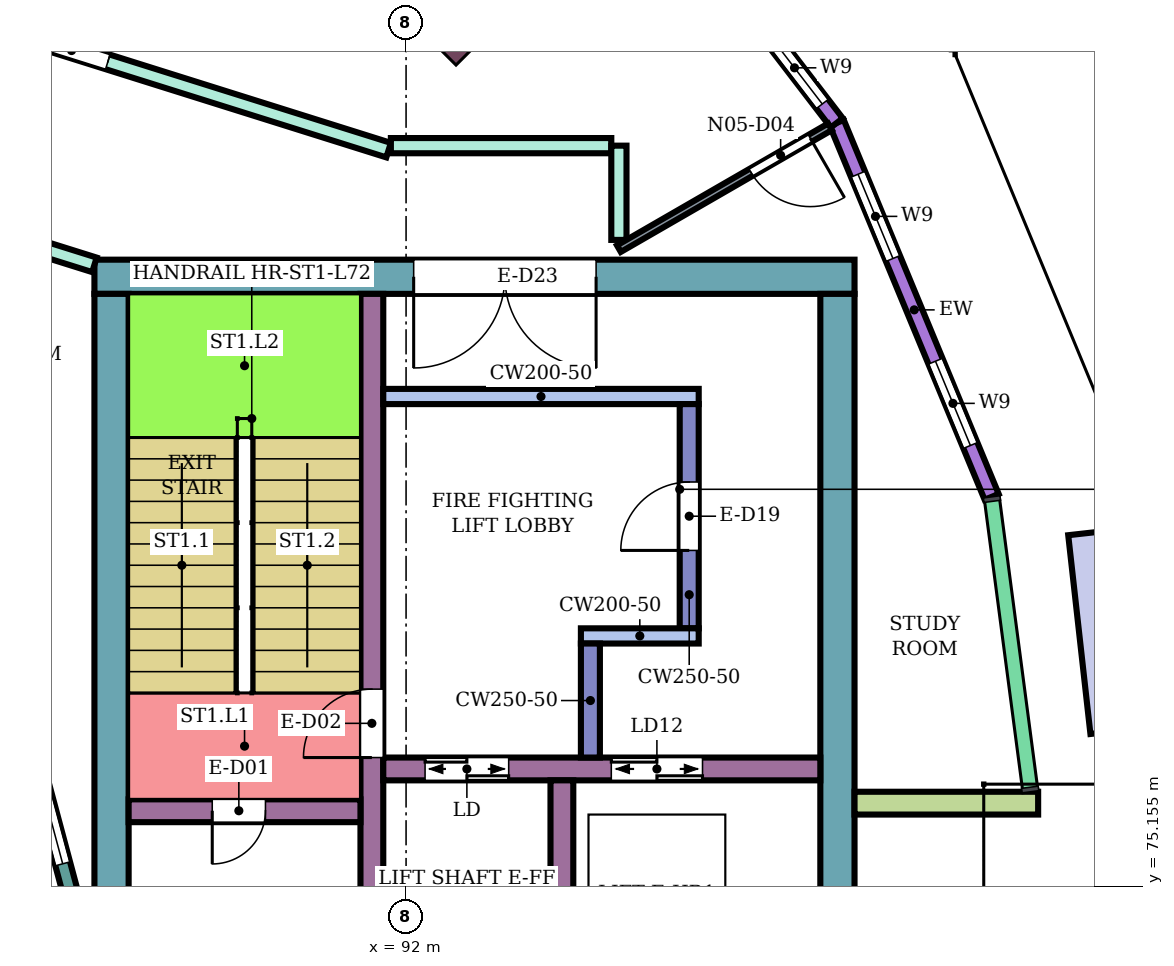
"""IFC4 building model, lengths in metres.
Left out: names, types, materials, properties, quantities, classifications, styles, units other than length and angle.
Written with IfcOpenShell. Run it as: python <this file> out.ifc"""

import sys

from ifc_helpers import new_model, si_unit, direction, frame, frame_2d, origin, origin_2d, place, context, subcontext, project, spatial, rectangle, extrude, element, fill, save


model = new_model("IFC4")
c1 = context("Model", 3, precision=1e-05, world=origin(), true_north=direction((0.0, 1.0)))
c2 = subcontext(c1, "Body", "Model", "MODEL_VIEW")
j1 = project(units=[si_unit("LENGTHUNIT", "METRE"), si_unit("PLANEANGLEUNIT", "RADIAN")], contexts=[c1])
p1 = place(None, origin())
s1 = spatial("IfcSite", under=j1, at=p1, CompositionType="ELEMENT")
p2 = place(p1, origin())
s2 = spatial("IfcBuilding", under=s1, at=p2, CompositionType="ELEMENT")
p3 = place(p2, frame((0.0, 0.0, 314.9)))
s3 = spatial("IfcBuildingStorey", under=s2, at=p3, CompositionType="ELEMENT", Elevation=314.9)
p4 = place(p3, frame((92.233, 87.233, 0.0), z_axis=(0.0, 0.0, 1.0), x_axis=(0.707106781187, 0.707106781187, 0.0)))
e1 = element("IfcColumn", 1, at=p4, inside=s3, PredefinedType="COLUMN", context=c2, shape_type="SweptSolid", body=[
    extrude(rectangle(XDim=1.2, YDim=2.4, at=origin_2d()), origin(), (0.0, 0.0, 1.0), 4.4),
])
p5 = place(p3, frame((87.9, 83.175, 0.0), z_axis=(0.0, 0.0, 1.0), x_axis=(1.0, 0.0, 0.0)))
e2 = element("IfcWall", 2, at=p5, inside=s3, PredefinedType="SHEAR", context=c2, shape_type="SweptSolid", body=[
    extrude(rectangle(XDim=10.0, YDim=0.45, at=frame_2d((5.0, 0.0))), origin(), (0.0, 0.0, 1.0), 4.08),
])
p6 = place(p5, frame((4.2, 0.0, 0.0)))
e3 = element("IfcOpeningElement", 3, at=p6, cuts=e2, PredefinedType="OPENING", context=c2, shape_type="SweptSolid", body=[
    extrude(rectangle(XDim=2.4, YDim=2.4, at=frame_2d((1.2, 1.2))), frame((0.0, 0.235, 0.0), z_axis=(0.0, -1.0, 0.0), x_axis=(1.0, 0.0, 0.0)), (0.0, 0.0, 1.0), 0.47),
])
p7 = place(p3, frame((88.125, 75.0, 0.0), z_axis=(0.0, 0.0, 1.0), x_axis=(0.0, 1.0, 0.0)))
e4 = element("IfcWall", 4, at=p7, inside=s3, PredefinedType="SHEAR", context=c2, shape_type="SweptSolid", body=[
    extrude(rectangle(XDim=7.95, YDim=0.45, at=frame_2d((3.975, 0.0))), origin(), (0.0, 0.0, 1.0), 4.08),
])
p8 = place(p3, frame((97.675, 73.6, 0.0), z_axis=(0.0, 0.0, 1.0), x_axis=(0.0, 1.0, 0.0)))
e5 = element("IfcWall", 5, at=p8, inside=s3, PredefinedType="SHEAR", context=c2, shape_type="SweptSolid", body=[
    extrude(rectangle(XDim=9.35, YDim=0.45, at=frame_2d((4.675, 0.0))), origin(), (0.0, 0.0, 1.0), 4.08),
])
p9 = place(p3, frame((91.55, 75.0, 0.0), z_axis=(0.0, 0.0, 1.0), x_axis=(0.0, 1.0, 0.0)))
e6 = element("IfcWall", 6, at=p9, inside=s3, PredefinedType="SHEAR", context=c2, shape_type="SweptSolid", body=[
    extrude(rectangle(XDim=7.95, YDim=0.3, at=frame_2d((3.975, 0.0))), origin(), (0.0, 0.0, 1.0), 4.08),
])
p10 = place(p9, frame((1.85, 0.0, 0.0)))
e7 = element("IfcOpeningElement", 7, at=p10, cuts=e6, PredefinedType="OPENING", context=c2, shape_type="SweptSolid", body=[
    extrude(rectangle(XDim=0.9, YDim=2.1, at=frame_2d((0.45, 1.05))), frame((0.0, 0.16, 0.0), z_axis=(0.0, -1.0, 0.0), x_axis=(1.0, 0.0, 0.0)), (0.0, 0.0, 1.0), 0.32),
])
p11 = place(p3, frame((88.35, 76.15, 0.0), z_axis=(0.0, 0.0, 1.0), x_axis=(1.0, 0.0, 0.0)))
e8 = element("IfcWall", 8, at=p11, inside=s3, PredefinedType="SHEAR", context=c2, shape_type="SweptSolid", body=[
    extrude(rectangle(XDim=3.05, YDim=0.3, at=frame_2d((1.525, 0.0))), origin(), (0.0, 0.0, 1.0), 4.08),
])
p12 = place(p11, frame((1.1, 0.0, 0.0)))
e9 = element("IfcOpeningElement", 9, at=p12, cuts=e8, PredefinedType="OPENING", context=c2, shape_type="SweptSolid", body=[
    extrude(rectangle(XDim=0.7, YDim=2.0, at=frame_2d((0.35, 1.0))), frame((0.0, 0.16, 0.0), z_axis=(0.0, -1.0, 0.0), x_axis=(1.0, 0.0, 0.0)), (0.0, 0.0, 1.0), 0.32),
])
p13 = place(p3, frame((91.7, 76.7, 0.0), z_axis=(0.0, 0.0, 1.0), x_axis=(1.0, 0.0, 0.0)))
e10 = element("IfcWall", 10, at=p13, inside=s3, PredefinedType="SHEAR", context=c2, shape_type="SweptSolid", body=[
    extrude(rectangle(XDim=5.75, YDim=0.3, at=frame_2d((2.875, 0.0))), origin(), (0.0, 0.0, 1.0), 4.08),
])
p14 = place(p13, frame((0.55, 0.0, 0.0)))
e11 = element("IfcOpeningElement", 11, at=p14, cuts=e10, PredefinedType="OPENING", context=c2, shape_type="SweptSolid", body=[
    extrude(rectangle(XDim=1.1, YDim=2.1, at=frame_2d((0.55, 1.05))), frame((0.0, 0.16, 0.0), z_axis=(0.0, -1.0, 0.0), x_axis=(1.0, 0.0, 0.0)), (0.0, 0.0, 1.0), 0.32),
])
p15 = place(p13, frame((3.0, 0.0, 0.0)))
e12 = element("IfcOpeningElement", 12, at=p15, cuts=e10, PredefinedType="OPENING", context=c2, shape_type="SweptSolid", body=[
    extrude(rectangle(XDim=1.2, YDim=2.1, at=frame_2d((0.6, 1.05))), frame((0.0, 0.16, 0.0), z_axis=(0.0, -1.0, 0.0), x_axis=(1.0, 0.0, 0.0)), (0.0, 0.0, 1.0), 0.32),
])
p16 = place(p3, frame((94.05, 74.0, 0.0), z_axis=(0.0, 0.0, 1.0), x_axis=(0.0, 1.0, 0.0)))
e13 = element("IfcWall", 13, at=p16, inside=s3, PredefinedType="SHEAR", context=c2, shape_type="SweptSolid", body=[
    extrude(rectangle(XDim=2.55, YDim=0.3, at=frame_2d((1.275, 0.0))), origin(), (0.0, 0.0, 1.0), 4.08),
])
p17 = place(p3, frame((91.7, 81.6, 0.0), z_axis=(0.0, 0.0, 1.0), x_axis=(1.0, 0.0, 0.0)))
e14 = element("IfcWall", 14, at=p17, inside=s3, PredefinedType="SHEAR", context=c2, shape_type="SweptSolid", body=[
    extrude(rectangle(XDim=4.15, YDim=0.2, at=frame_2d((2.075, 0.0))), origin(), (0.0, 0.0, 1.0), 4.08),
])
p18 = place(p3, frame((95.725, 78.55, 0.0), z_axis=(0.0, 0.0, 1.0), x_axis=(0.0, 1.0, 0.0)))
e15 = element("IfcWall", 15, at=p18, inside=s3, PredefinedType="SHEAR", context=c2, shape_type="SweptSolid", body=[
    extrude(rectangle(XDim=2.95, YDim=0.25, at=frame_2d((1.475, 0.0))), origin(), (0.0, 0.0, 1.0), 4.08),
])
p19 = place(p18, frame((1.025, 0.0, 0.0)))
e16 = element("IfcOpeningElement", 16, at=p19, cuts=e15, PredefinedType="OPENING", context=c2, shape_type="SweptSolid", body=[
    extrude(rectangle(XDim=0.9, YDim=2.1, at=frame_2d((0.45, 1.05))), frame((0.0, 0.135, 0.0), z_axis=(0.0, -1.0, 0.0), x_axis=(1.0, 0.0, 0.0)), (0.0, 0.0, 1.0), 0.27),
])
p20 = place(p3, frame((94.3, 78.45, 0.0), z_axis=(0.0, 0.0, 1.0), x_axis=(1.0, 0.0, 0.0)))
e17 = element("IfcWall", 17, at=p20, inside=s3, PredefinedType="SHEAR", context=c2, shape_type="SweptSolid", body=[
    extrude(rectangle(XDim=1.55, YDim=0.2, at=frame_2d((0.775, 0.0))), origin(), (0.0, 0.0, 1.0), 4.08),
])
p21 = place(p3, frame((94.425, 76.85, 0.0), z_axis=(0.0, 0.0, 1.0), x_axis=(0.0, 1.0, 0.0)))
e18 = element("IfcWall", 18, at=p21, inside=s3, PredefinedType="SHEAR", context=c2, shape_type="SweptSolid", body=[
    extrude(rectangle(XDim=1.5, YDim=0.25, at=frame_2d((0.75, 0.0))), origin(), (0.0, 0.0, 1.0), 4.08),
])
p22 = place(p3, frame((99.704, 80.28, 0.0), z_axis=(0.0, 0.0, 1.0), x_axis=(-0.382690574388, 0.923876574156, 0.0)))
e19 = element("IfcWall", 19, at=p22, inside=s3, PredefinedType="NOTDEFINED", context=c2, shape_type="SweptSolid", body=[
    extrude(rectangle(XDim=5.325, YDim=0.2, at=frame_2d((2.663, 0.0))), origin(), (0.0, 0.0, 1.0), 4.4),
])
p23 = place(p22, frame((0.731, 0.0, 0.9)))
e20 = element("IfcOpeningElement", 20, at=p23, cuts=e19, PredefinedType="OPENING", context=c2, shape_type="SweptSolid", body=[
    extrude(rectangle(XDim=1.2, YDim=2.7, at=frame_2d((0.6, 1.35))), frame((0.0, 0.11, 0.0), z_axis=(0.0, -1.0, 0.0), x_axis=(1.0, 0.0, 0.0)), (0.0, 0.0, 1.0), 0.22),
])
p24 = place(p22, frame((3.394, 0.0, 0.9)))
e21 = element("IfcOpeningElement", 21, at=p24, cuts=e19, PredefinedType="OPENING", context=c2, shape_type="SweptSolid", body=[
    extrude(rectangle(XDim=1.2, YDim=2.7, at=frame_2d((0.6, 1.35))), frame((0.0, 0.11, 0.0), z_axis=(0.0, -1.0, 0.0), x_axis=(1.0, 0.0, 0.0)), (0.0, 0.0, 1.0), 0.22),
])
p25 = place(p3, frame((97.666, 85.199, 0.0), z_axis=(0.0, 0.0, 1.0), x_axis=(-0.608757608177, 0.793356272104, 0.0)))
e22 = element("IfcWall", 22, at=p25, inside=s3, PredefinedType="NOTDEFINED", context=c2, shape_type="SweptSolid", body=[
    extrude(rectangle(XDim=3.913, YDim=0.2, at=frame_2d((1.957, 0.0))), origin(), (0.0, 0.0, 1.0), 4.4),
])
p26 = place(p25, frame((0.313, 0.0, 0.9)))
e23 = element("IfcOpeningElement", 23, at=p26, cuts=e22, PredefinedType="OPENING", context=c2, shape_type="SweptSolid", body=[
    extrude(rectangle(XDim=1.2, YDim=2.7, at=frame_2d((0.6, 1.35))), frame((0.0, 0.11, 0.0), z_axis=(0.0, -1.0, 0.0), x_axis=(1.0, 0.0, 0.0)), (0.0, 0.0, 1.0), 0.22),
])
p27 = place(p25, frame((1.813, 0.0, 0.0)))
e24 = element("IfcOpeningElement", 24, at=p27, cuts=e22, PredefinedType="OPENING", context=c2, shape_type="SweptSolid", body=[
    extrude(rectangle(XDim=1.8, YDim=2.7, at=frame_2d((0.9, 1.35))), frame((0.0, 0.11, 0.0), z_axis=(0.0, -1.0, 0.0), x_axis=(1.0, 0.0, 0.0)), (0.0, 0.0, 1.0), 0.22),
])
p28 = place(p3, frame((97.9, 76.25, 0.0), z_axis=(0.0, 0.0, 1.0), x_axis=(1.0, 0.0, 0.0)))
e25 = element("IfcWall", 25, at=p28, inside=s3, PredefinedType="NOTDEFINED", context=c2, shape_type="SweptSolid", body=[
    extrude(rectangle(XDim=2.416, YDim=0.3, at=frame_2d((1.208, 0.0))), origin(), (0.0, 0.0, 1.0), 4.4),
])
p29 = place(p3, frame((87.604, 75.0, 0.0), z_axis=(0.0, 0.0, 1.0), x_axis=(-0.258789828301, 0.965933654434, 0.0)))
e26 = element("IfcWall", 26, at=p29, inside=s3, PredefinedType="NOTDEFINED", context=c2, shape_type="SweptSolid", body=[
    extrude(rectangle(XDim=3.936, YDim=0.2, at=frame_2d((1.968, 0.0))), origin(), (0.0, 0.0, 1.0), 4.4),
])
p30 = place(p29, frame((0.468, 0.0, 0.9)))
e27 = element("IfcOpeningElement", 27, at=p30, cuts=e26, PredefinedType="OPENING", context=c2, shape_type="SweptSolid", body=[
    extrude(rectangle(XDim=3.0, YDim=2.3, at=frame_2d((1.5, 1.15))), frame((0.0, 0.11, 0.0), z_axis=(0.0, -1.0, 0.0), x_axis=(1.0, 0.0, 0.0)), (0.0, 0.0, 1.0), 0.22),
])
p31 = place(p3, frame((101.302, 77.193, 0.0), z_axis=(0.0, 0.0, 1.0), x_axis=(-0.1110526499, 0.993814524421, 0.0)))
e28 = element("IfcWall", 28, at=p31, inside=s3, PredefinedType="USERDEFINED", context=c2, shape_type="SweptSolid", body=[
    extrude(rectangle(XDim=2.632, YDim=0.6, at=frame_2d((1.316, 0.0))), origin(), (0.0, 0.0, 1.0), 0.6),
])
p32 = place(p3, frame((85.587, 84.057, 0.0), z_axis=(0.0, 0.0, 1.0), x_axis=(0.954239513179, -0.299043393987, 0.0)))
e29 = element("IfcWall", 29, at=p32, inside=s3, PredefinedType="PARTITIONING", context=c2, shape_type="SweptSolid", body=[
    extrude(rectangle(XDim=2.424, YDim=0.2, at=frame_2d((1.212, 0.0))), origin(), (0.0, 0.0, 1.0), 3.95),
])
p33 = place(p32, frame((0.762, 0.0, 0.0)))
e30 = element("IfcOpeningElement", 30, at=p33, cuts=e29, PredefinedType="OPENING", context=c2, shape_type="SweptSolid", body=[
    extrude(rectangle(XDim=0.9, YDim=2.1, at=frame_2d((0.45, 1.05))), frame((0.0, 0.11, 0.0), z_axis=(0.0, -1.0, 0.0), x_axis=(1.0, 0.0, 0.0)), (0.0, 0.0, 1.0), 0.22),
])
p34 = place(p3, frame((86.313, 86.555, 0.0), z_axis=(0.0, 0.0, 1.0), x_axis=(0.9540216201, -0.299737799389, 0.0)))
e31 = element("IfcWall", 31, at=p34, inside=s3, PredefinedType="PARTITIONING", context=c2, shape_type="SweptSolid", body=[
    extrude(rectangle(XDim=5.719, YDim=0.2, at=frame_2d((2.86, 0.0))), origin(), (0.0, 0.0, 1.0), 3.95),
])
p35 = place(p34, frame((0.848, 0.0, 0.0)))
e32 = element("IfcOpeningElement", 32, at=p35, cuts=e31, PredefinedType="OPENING", context=c2, shape_type="SweptSolid", body=[
    extrude(rectangle(XDim=1.0, YDim=2.1, at=frame_2d((0.5, 1.05))), frame((0.0, 0.11, 0.0), z_axis=(0.0, -1.0, 0.0), x_axis=(1.0, 0.0, 0.0)), (0.0, 0.0, 1.0), 0.22),
])
p36 = place(p3, frame((91.8, 84.9, 0.0), z_axis=(0.0, 0.0, 1.0), x_axis=(1.0, 0.0, 0.0)))
e33 = element("IfcWall", 33, at=p36, inside=s3, PredefinedType="PARTITIONING", context=c2, shape_type="SweptSolid", body=[
    extrude(rectangle(XDim=2.9, YDim=0.2, at=frame_2d((1.45, 0.0))), origin(), (0.0, 0.0, 1.0), 3.95),
])
p37 = place(p3, frame((94.8, 83.66, 0.0), z_axis=(0.0, 0.0, 1.0), x_axis=(0.0, 1.0, 0.0)))
e34 = element("IfcWall", 34, at=p37, inside=s3, PredefinedType="PARTITIONING", context=c2, shape_type="SweptSolid", body=[
    extrude(rectangle(XDim=1.24, YDim=0.2, at=frame_2d((0.62, 0.0))), origin(), (0.0, 0.0, 1.0), 3.95),
])
p38 = place(p3, frame((94.8, 83.545, 0.0), z_axis=(0.0, 0.0, 1.0), x_axis=(0.866141222235, 0.499799342882, 0.0)))
e35 = element("IfcWall", 35, at=p38, inside=s3, PredefinedType="PARTITIONING", context=c2, shape_type="SweptSolid", body=[
    extrude(rectangle(XDim=3.207, YDim=0.1, at=frame_2d((1.604, 0.0))), origin(), (0.0, 0.0, 1.0), 3.95),
])
p39 = place(p38, frame((2.007, 0.0, 0.0)))
e36 = element("IfcOpeningElement", 36, at=p39, cuts=e35, PredefinedType="OPENING", context=c2, shape_type="SweptSolid", body=[
    extrude(rectangle(XDim=0.9, YDim=2.1, at=frame_2d((0.45, 1.05))), frame((0.0, 0.06, 0.0), z_axis=(0.0, -1.0, 0.0), x_axis=(1.0, 0.0, 0.0)), (0.0, 0.0, 1.0), 0.12),
])
p40 = place(p23, origin())
e37 = element("IfcWindow", 37, at=p40, inside=s3, PartitioningType="SINGLE_PANEL", PredefinedType="WINDOW", context=c2, shape_type="SweptSolid", body=[
    extrude(rectangle(XDim=1.2, YDim=2.7, at=frame_2d((0.6, 1.35))), frame((0.0, 0.03, 0.0), z_axis=(0.0, -1.0, 0.0), x_axis=(1.0, 0.0, 0.0)), (0.0, 0.0, 1.0), 0.06),
])
fill(e20, e37)
p41 = place(p24, origin())
e38 = element("IfcWindow", 38, at=p41, inside=s3, PartitioningType="SINGLE_PANEL", PredefinedType="WINDOW", context=c2, shape_type="SweptSolid", body=[
    extrude(rectangle(XDim=1.2, YDim=2.7, at=frame_2d((0.6, 1.35))), frame((0.0, 0.03, 0.0), z_axis=(0.0, -1.0, 0.0), x_axis=(1.0, 0.0, 0.0)), (0.0, 0.0, 1.0), 0.06),
])
fill(e21, e38)
p42 = place(p26, origin())
e39 = element("IfcWindow", 39, at=p42, inside=s3, PartitioningType="SINGLE_PANEL", PredefinedType="WINDOW", context=c2, shape_type="SweptSolid", body=[
    extrude(rectangle(XDim=1.2, YDim=2.7, at=frame_2d((0.6, 1.35))), frame((0.0, 0.03, 0.0), z_axis=(0.0, -1.0, 0.0), x_axis=(1.0, 0.0, 0.0)), (0.0, 0.0, 1.0), 0.06),
])
fill(e23, e39)
p43 = place(p30, origin())
e40 = element("IfcWindow", 40, at=p43, inside=s3, PartitioningType="SINGLE_PANEL", PredefinedType="WINDOW", context=c2, shape_type="SweptSolid", body=[
    extrude(rectangle(XDim=3.0, YDim=2.3, at=frame_2d((1.5, 1.15))), frame((0.0, 0.03, 0.0), z_axis=(0.0, -1.0, 0.0), x_axis=(1.0, 0.0, 0.0)), (0.0, 0.0, 1.0), 0.06),
])
fill(e27, e40)
p44 = place(p35, origin())
e41 = element("IfcDoor", 41, at=p44, inside=s3, OperationType="SINGLE_SWING_LEFT", PredefinedType="DOOR", context=c2, shape_type="SweptSolid", body=[
    extrude(rectangle(XDim=1.0, YDim=2.1, at=frame_2d((0.5, 1.05))), frame((0.0, 0.025, 0.0), z_axis=(0.0, -1.0, 0.0), x_axis=(1.0, 0.0, 0.0)), (0.0, 0.0, 1.0), 0.05),
])
fill(e32, e41)
p45 = place(p39, frame((0.9, 0.0, 0.0), z_axis=(0.0, 0.0, 1.0), x_axis=(-1.0, 0.0, 0.0)))
e42 = element("IfcDoor", 42, at=p45, inside=s3, OperationType="SINGLE_SWING_LEFT", PredefinedType="DOOR", context=c2, shape_type="SweptSolid", body=[
    extrude(rectangle(XDim=0.9, YDim=2.1, at=frame_2d((0.45, 1.05))), frame((0.0, 0.025, 0.0), z_axis=(0.0, -1.0, 0.0), x_axis=(1.0, 0.0, 0.0)), (0.0, 0.0, 1.0), 0.05),
])
fill(e36, e42)
p46 = place(p12, frame((0.7, 0.0, 0.0), z_axis=(0.0, 0.0, 1.0), x_axis=(-1.0, 0.0, 0.0)))
e43 = element("IfcDoor", 43, at=p46, inside=s3, OperationType="SINGLE_SWING_RIGHT", PredefinedType="DOOR", context=c2, shape_type="SweptSolid", body=[
    extrude(rectangle(XDim=0.7, YDim=2.0, at=frame_2d((0.35, 1.0))), frame((0.0, 0.025, 0.0), z_axis=(0.0, -1.0, 0.0), x_axis=(1.0, 0.0, 0.0)), (0.0, 0.0, 1.0), 0.05),
])
fill(e9, e43)
p47 = place(p10, origin())
e44 = element("IfcDoor", 44, at=p47, inside=s3, OperationType="SINGLE_SWING_LEFT", PredefinedType="DOOR", context=c2, shape_type="SweptSolid", body=[
    extrude(rectangle(XDim=0.9, YDim=2.1, at=frame_2d((0.45, 1.05))), frame((0.0, 0.025, 0.0), z_axis=(0.0, -1.0, 0.0), x_axis=(1.0, 0.0, 0.0)), (0.0, 0.0, 1.0), 0.05),
])
fill(e7, e44)
p48 = place(p14, origin())
e45 = element("IfcDoor", 45, at=p48, inside=s3, OperationType="DOUBLE_DOOR_SLIDING", PredefinedType="DOOR", context=c2, shape_type="SweptSolid", body=[
    extrude(rectangle(XDim=1.1, YDim=2.1, at=frame_2d((0.55, 1.05))), frame((0.0, 0.025, 0.0), z_axis=(0.0, -1.0, 0.0), x_axis=(1.0, 0.0, 0.0)), (0.0, 0.0, 1.0), 0.05),
])
fill(e11, e45)
p49 = place(p15, origin())
e46 = element("IfcDoor", 46, at=p49, inside=s3, OperationType="DOUBLE_DOOR_SLIDING", PredefinedType="DOOR", context=c2, shape_type="SweptSolid", body=[
    extrude(rectangle(XDim=1.2, YDim=2.1, at=frame_2d((0.6, 1.05))), frame((0.0, 0.025, 0.0), z_axis=(0.0, -1.0, 0.0), x_axis=(1.0, 0.0, 0.0)), (0.0, 0.0, 1.0), 0.05),
])
fill(e12, e46)
p50 = place(p19, origin())
e47 = element("IfcDoor", 47, at=p50, inside=s3, OperationType="SINGLE_SWING_LEFT", PredefinedType="DOOR", context=c2, shape_type="SweptSolid", body=[
    extrude(rectangle(XDim=0.9, YDim=2.1, at=frame_2d((0.45, 1.05))), frame((0.0, 0.025, 0.0), z_axis=(0.0, -1.0, 0.0), x_axis=(1.0, 0.0, 0.0)), (0.0, 0.0, 1.0), 0.05),
])
fill(e16, e47)
p51 = place(p6, frame((2.4, 0.0, 0.0), z_axis=(0.0, 0.0, 1.0), x_axis=(-1.0, 0.0, 0.0)))
e48 = element("IfcDoor", 48, at=p51, inside=s3, OperationType="DOUBLE_DOOR_SINGLE_SWING", PredefinedType="DOOR", context=c2, shape_type="SweptSolid", body=[
    extrude(rectangle(XDim=2.4, YDim=2.4, at=frame_2d((1.2, 1.2))), frame((0.0, 0.025, 0.0), z_axis=(0.0, -1.0, 0.0), x_axis=(1.0, 0.0, 0.0)), (0.0, 0.0, 1.0), 0.05),
])
fill(e3, e48)
save(model, sys.argv[1])
